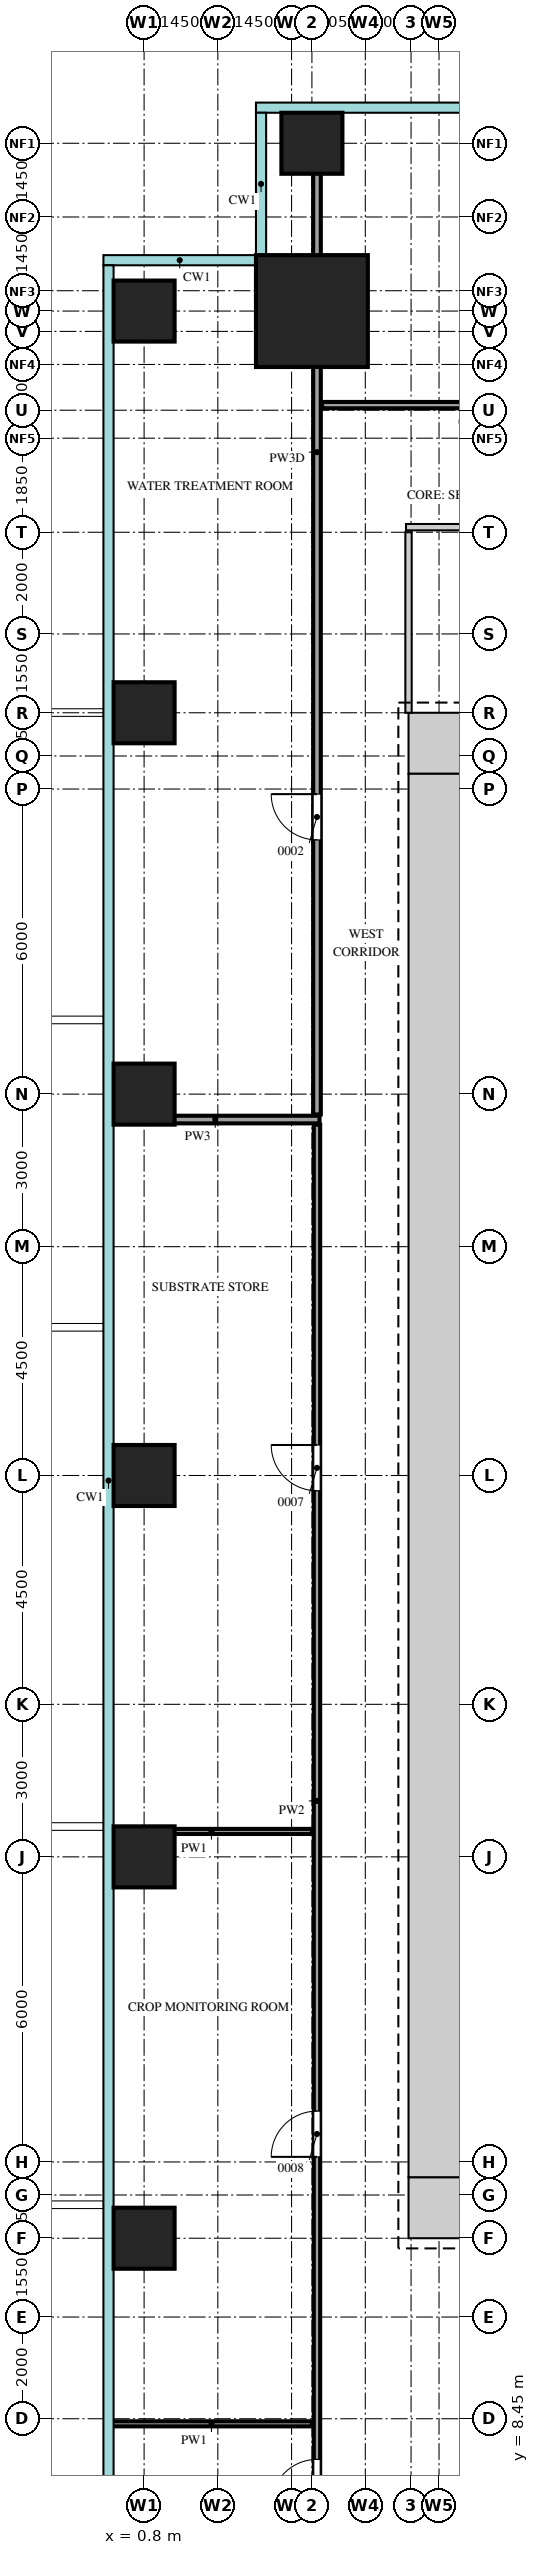
"""IFC4 building model, lengths in metres.
Left out: names, types, materials, properties, quantities, classifications, styles, units other than length and angle.
Written with IfcOpenShell. Run it as: python <this file> out.ifc"""

import sys

from ifc_helpers import new_model, si_unit, direction, frame, frame_2d, origin, origin_2d, place, context, subcontext, project, spatial, rectangle, extrude, source, transform, mapped, element, fill, save


model = new_model("IFC4")
c1 = context("Model", 3, precision=1e-05, world=origin(), true_north=direction((0.0, 1.0)))
c2 = subcontext(c1, "Body", "Model", "MODEL_VIEW")
j1 = project(units=[si_unit("LENGTHUNIT", "METRE"), si_unit("PLANEANGLEUNIT", "RADIAN")], contexts=[c1])
p1 = place(None, origin())
s1 = spatial("IfcSite", under=j1, at=p1, CompositionType="ELEMENT")
p2 = place(p1, origin())
s2 = spatial("IfcBuilding", under=s1, at=p2, CompositionType="ELEMENT")
p3 = place(p2, frame((0.0, 0.0, 42.0)))
s3 = spatial("IfcBuildingStorey", under=s2, at=p3, CompositionType="ELEMENT", Elevation=42.0)
m1 = source(origin(), c2, "Body", "SweptSolid", [
    extrude(rectangle(XDim=1.2, YDim=1.2, at=frame_2d((0.6, 0.0))), origin(), (0.0, 0.0, 1.0), 4.2),
])
for number, where, z_axis, x_axis in (
    (1, (6.0, 41.4, 0.0), (0.0, 0.0, 1.0), (1.0, 0.0, 0.0)),
    (2, (6.0, 12.6, 0.0), (0.0, 0.0, 1.0), (1.0, 0.0, 0.0)),
):
    element("IfcWall", number, at=place(p3, frame(where, z_axis=z_axis, x_axis=x_axis)), inside=s3, PredefinedType="SHEAR", context=c2, shape_type="MappedRepresentation", body=[
        mapped(m1, transform((0.0, 0.0, 0.0))),
    ])
m2 = source(origin(), c2, "Body", "SweptSolid", [
    extrude(rectangle(XDim=27.6, YDim=1.2, at=frame_2d((13.8, 0.0))), origin(), (0.0, 0.0, 1.0), 4.2),
])
p4 = place(p3, frame((6.6, 13.2, 0.0), z_axis=(0.0, 0.0, 1.0), x_axis=(0.0, 1.0, 0.0)))
e3 = element("IfcWall", 3, at=p4, inside=s3, PredefinedType="SHEAR", context=c2, shape_type="MappedRepresentation", body=[
    mapped(m2, transform((0.0, 0.0, 0.0))),
])
m3 = source(origin(), c2, "Body", "SweptSolid", [
    extrude(rectangle(XDim=2.2, YDim=2.2, at=origin_2d()), origin(), (0.0, 0.0, 1.0), 4.5),
])
p5 = place(p3, frame((4.1, 49.9, 0.0), z_axis=(0.0, 0.0, 1.0), x_axis=(1.0, 0.0, 0.0)))
e4 = element("IfcColumn", 4, at=p5, inside=s3, PredefinedType="COLUMN", context=c2, shape_type="MappedRepresentation", body=[
    mapped(m3, transform((0.0, 0.0, 0.0))),
])
m4 = source(origin(), c2, "Body", "SweptSolid", [
    extrude(rectangle(XDim=1.2, YDim=1.2, at=origin_2d()), origin(), (0.0, 0.0, 1.0), 4.2),
])
for number, where, z_axis, x_axis in (
    (5, (4.1, 53.2, 0.0), (0.0, 0.0, 1.0), (1.0, 0.0, 0.0)),
    (6, (0.8, 12.0, 0.0), (0.0, 0.0, 1.0), (1.0, 0.0, 0.0)),
    (7, (0.8, 19.5, 0.0), (0.0, 0.0, 1.0), (1.0, 0.0, 0.0)),
    (8, (0.8, 27.0, 0.0), (0.0, 0.0, 1.0), (1.0, 0.0, 0.0)),
    (9, (0.8, 34.5, 0.0), (0.0, 0.0, 1.0), (1.0, 0.0, 0.0)),
    (10, (0.8, 42.0, 0.0), (0.0, 0.0, 1.0), (1.0, 0.0, 0.0)),
    (11, (0.8, 49.9, 0.0), (0.0, 0.0, 1.0), (1.0, 0.0, 0.0)),
):
    element("IfcColumn", number, at=place(p3, frame(where, z_axis=z_axis, x_axis=x_axis)), inside=s3, PredefinedType="COLUMN", context=c2, shape_type="MappedRepresentation", body=[
        mapped(m4, transform((0.0, 0.0, 0.0))),
    ])
m5 = source(origin(), c2, "Body", "SweptSolid", [
    extrude(rectangle(XDim=27.75, YDim=0.125, at=frame_2d((13.875, 0.0))), origin(), (0.0, 0.0, 1.0), 4.3),
])
p6 = place(p3, frame((4.2, 6.15, 0.0), z_axis=(0.0, 0.0, 1.0), x_axis=(0.0, 1.0, 0.0)))
e12 = element("IfcWall", 12, at=p6, inside=s3, PredefinedType="PARTITIONING", context=c2, shape_type="MappedRepresentation", body=[
    mapped(m5, transform((0.0, 0.0, 0.0))),
])
m6 = source(origin(), c2, "Body", "SweptSolid", [
    extrude(rectangle(XDim=0.9, YDim=2.1, at=frame_2d((0.45, 1.05))), frame((0.0, 0.073, 0.0), z_axis=(0.0, -1.0, 0.0), x_axis=(1.0, 0.0, 0.0)), (0.0, 0.0, 1.0), 0.145),
])
p7 = place(p6, frame((0.6, 0.0, 0.0)))
e13 = element("IfcOpeningElement", 13, at=p7, cuts=e12, PredefinedType="OPENING", context=c2, shape_type="MappedRepresentation", body=[
    mapped(m6, transform((0.0, 0.0, 0.0))),
])
p8 = place(p6, frame((7.45, 0.0, 0.0)))
e14 = element("IfcOpeningElement", 14, at=p8, cuts=e12, PredefinedType="OPENING", context=c2, shape_type="MappedRepresentation", body=[
    mapped(m6, transform((0.0, 0.0, 0.0))),
])
p9 = place(p6, frame((20.55, 0.0, 0.0)))
e15 = element("IfcOpeningElement", 15, at=p9, cuts=e12, PredefinedType="OPENING", context=c2, shape_type="MappedRepresentation", body=[
    mapped(m6, transform((0.0, 0.0, 0.0))),
])
m7 = source(origin(), c2, "Body", "SweptSolid", [
    extrude(rectangle(XDim=3.95, YDim=0.1, at=frame_2d((1.975, 0.0))), origin(), (0.0, 0.0, 1.0), 4.3),
])
for number, where, z_axis, x_axis in (
    (16, (0.15, 8.35, 0.0), (0.0, 0.0, 1.0), (1.0, 0.0, 0.0)),
    (17, (0.15, 20.0, 0.0), (0.0, 0.0, 1.0), (1.0, 0.0, 0.0)),
):
    element("IfcWall", number, at=place(p3, frame(where, z_axis=z_axis, x_axis=x_axis)), inside=s3, PredefinedType="PARTITIONING", context=c2, shape_type="MappedRepresentation", body=[
        mapped(m7, transform((0.0, 0.0, 0.0))),
    ])
m8 = source(origin(), c2, "Body", "SweptSolid", [
    extrude(rectangle(XDim=4.1, YDim=0.15, at=frame_2d((2.05, 0.0))), origin(), (0.0, 0.0, 1.0), 4.3),
])
p10 = place(p3, frame((0.15, 34.0, 0.0), z_axis=(0.0, 0.0, 1.0), x_axis=(1.0, 0.0, 0.0)))
e18 = element("IfcWall", 18, at=p10, inside=s3, PredefinedType="PARTITIONING", context=c2, shape_type="MappedRepresentation", body=[
    mapped(m8, transform((0.0, 0.0, 0.0))),
])
m9 = source(origin(), c2, "Body", "SweptSolid", [
    extrude(rectangle(XDim=19.75, YDim=0.15, at=frame_2d((9.875, 0.0))), origin(), (0.0, 0.0, 1.0), 3.6),
])
p11 = place(p3, frame((4.2, 34.1, 0.0), z_axis=(0.0, 0.0, 1.0), x_axis=(0.0, 1.0, 0.0)))
e19 = element("IfcWall", 19, at=p11, inside=s3, PredefinedType="PARTITIONING", context=c2, shape_type="MappedRepresentation", body=[
    mapped(m9, transform((0.0, 0.0, 0.0))),
])
m10 = source(origin(), c2, "Body", "SweptSolid", [
    extrude(rectangle(XDim=0.9, YDim=2.1, at=frame_2d((0.45, 1.05))), frame((0.0, 0.085, 0.0), z_axis=(0.0, -1.0, 0.0), x_axis=(1.0, 0.0, 0.0)), (0.0, 0.0, 1.0), 0.17),
])
p12 = place(p11, frame((5.4, 0.0, 0.0)))
e20 = element("IfcOpeningElement", 20, at=p12, cuts=e19, PredefinedType="OPENING", context=c2, shape_type="MappedRepresentation", body=[
    mapped(m10, transform((0.0, 0.0, 0.0))),
])
m11 = source(origin(), c2, "Body", "SweptSolid", [
    extrude(rectangle(XDim=3.55, YDim=0.125, at=frame_2d((1.775, 0.0))), origin(), (0.0, 0.0, 1.0), 4.3),
])
p13 = place(p3, frame((6.0, 42.0, 0.0), z_axis=(0.0, 0.0, 1.0), x_axis=(0.0, 1.0, 0.0)))
e21 = element("IfcWall", 21, at=p13, inside=s3, PredefinedType="PARTITIONING", context=c2, shape_type="MappedRepresentation", body=[
    mapped(m11, transform((0.0, 0.0, 0.0))),
])
m12 = source(origin(), c2, "Body", "SweptSolid", [
    extrude(rectangle(XDim=7.95, YDim=0.125, at=frame_2d((3.975, 0.0))), origin(), (0.0, 0.0, 1.0), 4.3),
])
p14 = place(p3, frame((5.95, 45.65, 0.0), z_axis=(0.0, 0.0, 1.0), x_axis=(1.0, 0.0, 0.0)))
e22 = element("IfcWall", 22, at=p14, inside=s3, PredefinedType="PARTITIONING", context=c2, shape_type="MappedRepresentation", body=[
    mapped(m12, transform((0.0, 0.0, 0.0))),
])
p15 = place(p14, frame((3.55, 0.0, 0.0)))
e23 = element("IfcOpeningElement", 23, at=p15, cuts=e22, PredefinedType="OPENING", context=c2, shape_type="MappedRepresentation", body=[
    mapped(m6, transform((0.0, 0.0, 0.0))),
])
m13 = source(origin(), c2, "Body", "SweptSolid", [
    extrude(rectangle(XDim=26.45, YDim=0.125, at=frame_2d((13.225, 0.0))), origin(), (0.0, 0.0, 1.0), 4.3),
])
p16 = place(p3, frame((4.3, 48.05, 0.0), z_axis=(0.0, 0.0, 1.0), x_axis=(1.0, 0.0, 0.0)))
e24 = element("IfcWall", 24, at=p16, inside=s3, PredefinedType="PARTITIONING", context=c2, shape_type="MappedRepresentation", body=[
    mapped(m13, transform((0.0, 0.0, 0.0))),
])
p17 = place(p16, frame((3.35, 0.0, 0.0)))
e25 = element("IfcOpeningElement", 25, at=p17, cuts=e24, PredefinedType="OPENING", context=c2, shape_type="MappedRepresentation", body=[
    mapped(m6, transform((0.0, 0.0, 0.0))),
])
p18 = place(p16, frame((10.85, 0.0, 0.0)))
e26 = element("IfcOpeningElement", 26, at=p18, cuts=e24, PredefinedType="OPENING", context=c2, shape_type="MappedRepresentation", body=[
    mapped(m6, transform((0.0, 0.0, 0.0))),
])
p19 = place(p16, frame((20.35, 0.0, 0.0)))
e27 = element("IfcOpeningElement", 27, at=p19, cuts=e24, PredefinedType="OPENING", context=c2, shape_type="MappedRepresentation", body=[
    mapped(m6, transform((0.0, 0.0, 0.0))),
])
m14 = source(origin(), c2, "Body", "SweptSolid", [
    extrude(rectangle(XDim=0.9, YDim=2.1, at=frame_2d((0.45, 1.05))), frame((0.0, 0.025, 0.0), z_axis=(0.0, -1.0, 0.0), x_axis=(1.0, 0.0, 0.0)), (0.0, 0.0, 1.0), 0.05),
])
p20 = place(p7, origin())
e28 = element("IfcDoor", 28, at=p20, inside=s3, OperationType="SINGLE_SWING_RIGHT", PredefinedType="DOOR", context=c2, shape_type="MappedRepresentation", body=[
    mapped(m14, transform((0.0, 0.0, 0.0))),
])
fill(e13, e28)
p21 = place(p8, origin())
e29 = element("IfcDoor", 29, at=p21, inside=s3, OperationType="SINGLE_SWING_RIGHT", PredefinedType="DOOR", context=c2, shape_type="MappedRepresentation", body=[
    mapped(m14, transform((0.0, 0.0, 0.0))),
])
fill(e14, e29)
p22 = place(p9, origin())
e30 = element("IfcDoor", 30, at=p22, inside=s3, OperationType="SINGLE_SWING_LEFT", PredefinedType="DOOR", context=c2, shape_type="MappedRepresentation", body=[
    mapped(m14, transform((0.0, 0.0, 0.0))),
])
fill(e15, e30)
p23 = place(p12, origin())
e31 = element("IfcDoor", 31, at=p23, inside=s3, OperationType="SINGLE_SWING_LEFT", PredefinedType="DOOR", context=c2, shape_type="MappedRepresentation", body=[
    mapped(m14, transform((0.0, 0.0, 0.0))),
])
fill(e20, e31)
save(model, sys.argv[1])
